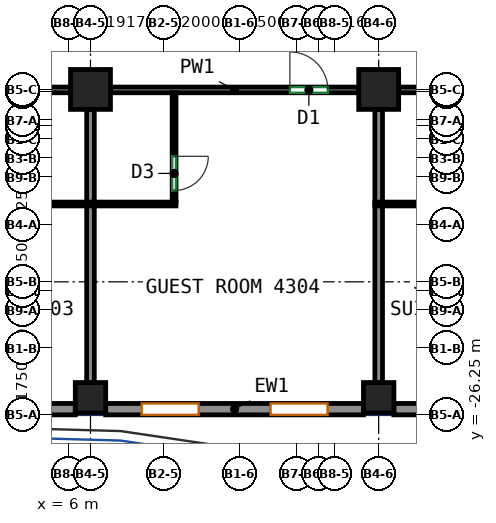
"""IFC4 building model, lengths in metres.
Left out: names, types, materials, properties, quantities, classifications, styles, units other than length and angle.
Written with IfcOpenShell. Run it as: python <this file> out.ifc"""

import sys

from ifc_helpers import new_model, si_unit, direction, frame, frame_2d, origin, origin_2d, place, context, subcontext, project, spatial, rectangle, extrude, source, transform, mapped, element, fill, save


model = new_model("IFC4")
c1 = context("Model", 3, precision=1e-05, world=origin(), true_north=direction((0.0, 1.0)))
c2 = subcontext(c1, "Body", "Model", "MODEL_VIEW")
j1 = project(units=[si_unit("LENGTHUNIT", "METRE"), si_unit("PLANEANGLEUNIT", "RADIAN")], contexts=[c1])
p1 = place(None, origin())
s1 = spatial("IfcSite", under=j1, at=p1, CompositionType="ELEMENT")
p2 = place(p1, origin())
s2 = spatial("IfcBuilding", under=s1, at=p2, CompositionType="ELEMENT")
p3 = place(p2, frame((0.0, 0.0, 182.1)))
s3 = spatial("IfcBuildingStorey", under=s2, at=p3, CompositionType="ELEMENT", Elevation=182.1)
m1 = source(origin(), c2, "Body", "SweptSolid", [
    extrude(rectangle(XDim=0.8, YDim=0.8, at=origin_2d()), origin(), (0.0, 0.0, 1.0), 3.12),
])
p4 = place(p3, frame((6.583, -25.8, 0.0), z_axis=(0.0, 0.0, 1.0), x_axis=(1.0, 0.0, 0.0)))
e1 = element("IfcColumn", 1, at=p4, inside=s3, PredefinedType="COLUMN", context=c2, shape_type="MappedRepresentation", body=[
    mapped(m1, transform((0.0, 0.0, 0.0))),
])
m2 = source(origin(), c2, "Body", "SweptSolid", [
    extrude(rectangle(XDim=1.05, YDim=1.05, at=origin_2d()), origin(), (0.0, 0.0, 1.0), 3.12),
])
p5 = place(p3, frame((6.583, -17.688, 0.0), z_axis=(0.0, 0.0, 1.0), x_axis=(1.0, 0.0, 0.0)))
e2 = element("IfcColumn", 2, at=p5, inside=s3, PredefinedType="COLUMN", context=c2, shape_type="MappedRepresentation", body=[
    mapped(m2, transform((0.0, 0.0, 0.0))),
])
p6 = place(p3, frame((14.167, -25.8, 0.0), z_axis=(0.0, 0.0, 1.0), x_axis=(1.0, 0.0, 0.0)))
e3 = element("IfcColumn", 3, at=p6, inside=s3, PredefinedType="COLUMN", context=c2, shape_type="MappedRepresentation", body=[
    mapped(m1, transform((0.0, 0.0, 0.0))),
])
p7 = place(p3, frame((14.167, -17.688, 0.0), z_axis=(0.0, 0.0, 1.0), x_axis=(1.0, 0.0, 0.0)))
e4 = element("IfcColumn", 4, at=p7, inside=s3, PredefinedType="COLUMN", context=c2, shape_type="MappedRepresentation", body=[
    mapped(m2, transform((0.0, 0.0, 0.0))),
])
m3 = source(origin(), c2, "Body", "SweptSolid", [
    extrude(rectangle(XDim=6.783, YDim=0.3, at=frame_2d((3.392, 0.0))), origin(), (0.0, 0.0, 1.0), 3.12),
])
p8 = place(p3, frame((-0.6, -26.1, 0.0), z_axis=(0.0, 0.0, 1.0), x_axis=(1.0, 0.0, 0.0)))
e5 = element("IfcWall", 5, at=p8, inside=s3, PredefinedType="SOLIDWALL", context=c2, shape_type="MappedRepresentation", body=[
    mapped(m3, transform((0.0, 0.0, 0.0))),
])
p9 = place(p8, frame((0.946, 0.0, 0.85)))
e6 = element("IfcOpeningElement", 6, at=p9, cuts=e5, PredefinedType="OPENING", context=c2, shape_type="SweptSolid", body=[
    extrude(rectangle(XDim=1.5, YDim=1.95, at=frame_2d((0.75, 0.975))), frame((0.0, 0.16, 0.0), z_axis=(0.0, -1.0, 0.0), x_axis=(1.0, 0.0, 0.0)), (0.0, 0.0, 1.0), 0.32),
])
p10 = place(p8, frame((4.337, 0.0, 0.85)))
e7 = element("IfcOpeningElement", 7, at=p10, cuts=e5, PredefinedType="OPENING", context=c2, shape_type="SweptSolid", body=[
    extrude(rectangle(XDim=1.5, YDim=1.95, at=frame_2d((0.75, 0.975))), frame((0.0, 0.16, 0.0), z_axis=(0.0, -1.0, 0.0), x_axis=(1.0, 0.0, 0.0)), (0.0, 0.0, 1.0), 0.32),
])
m4 = source(origin(), c2, "Body", "SweptSolid", [
    extrude(rectangle(XDim=6.783, YDim=0.3, at=frame_2d((3.392, 0.0))), origin(), (0.0, 0.0, 1.0), 3.12),
])
p11 = place(p3, frame((6.983, -26.1, 0.0), z_axis=(0.0, 0.0, 1.0), x_axis=(1.0, 0.0, 0.0)))
e8 = element("IfcWall", 8, at=p11, inside=s3, PredefinedType="SOLIDWALL", context=c2, shape_type="MappedRepresentation", body=[
    mapped(m4, transform((0.0, 0.0, 0.0))),
])
p12 = place(p11, frame((0.946, 0.0, 0.85)))
e9 = element("IfcOpeningElement", 9, at=p12, cuts=e8, PredefinedType="OPENING", context=c2, shape_type="SweptSolid", body=[
    extrude(rectangle(XDim=1.5, YDim=1.95, at=frame_2d((0.75, 0.975))), frame((0.0, 0.16, 0.0), z_axis=(0.0, -1.0, 0.0), x_axis=(1.0, 0.0, 0.0)), (0.0, 0.0, 1.0), 0.32),
])
p13 = place(p11, frame((4.338, 0.0, 0.85)))
e10 = element("IfcOpeningElement", 10, at=p13, cuts=e8, PredefinedType="OPENING", context=c2, shape_type="SweptSolid", body=[
    extrude(rectangle(XDim=1.5, YDim=1.95, at=frame_2d((0.75, 0.975))), frame((0.0, 0.16, 0.0), z_axis=(0.0, -1.0, 0.0), x_axis=(1.0, 0.0, 0.0)), (0.0, 0.0, 1.0), 0.32),
])
p14 = place(p3, frame((14.567, -26.1, 0.0), z_axis=(0.0, 0.0, 1.0), x_axis=(1.0, 0.0, 0.0)))
e11 = element("IfcWall", 11, at=p14, inside=s3, PredefinedType="SOLIDWALL", context=c2, shape_type="MappedRepresentation", body=[
    mapped(m3, transform((0.0, 0.0, 0.0))),
])
p15 = place(p14, frame((0.946, 0.0, 0.85)))
e12 = element("IfcOpeningElement", 12, at=p15, cuts=e11, PredefinedType="OPENING", context=c2, shape_type="SweptSolid", body=[
    extrude(rectangle(XDim=1.5, YDim=1.95, at=frame_2d((0.75, 0.975))), frame((0.0, 0.16, 0.0), z_axis=(0.0, -1.0, 0.0), x_axis=(1.0, 0.0, 0.0)), (0.0, 0.0, 1.0), 0.32),
])
p16 = place(p14, frame((4.337, 0.0, 0.85)))
e13 = element("IfcOpeningElement", 13, at=p16, cuts=e11, PredefinedType="OPENING", context=c2, shape_type="SweptSolid", body=[
    extrude(rectangle(XDim=1.5, YDim=1.95, at=frame_2d((0.75, 0.975))), frame((0.0, 0.16, 0.0), z_axis=(0.0, -1.0, 0.0), x_axis=(1.0, 0.0, 0.0)), (0.0, 0.0, 1.0), 0.32),
])
p17 = place(p3, frame((-0.475, -17.7, 0.0), z_axis=(0.0, 0.0, 1.0), x_axis=(1.0, 0.0, 0.0)))
e14 = element("IfcWall", 14, at=p17, inside=s3, PredefinedType="PARTITIONING", context=c2, shape_type="SweptSolid", body=[
    extrude(rectangle(XDim=6.533, YDim=0.15, at=frame_2d((3.267, 0.0))), origin(), (0.0, 0.0, 1.0), 3.12),
])
p18 = place(p17, frame((1.926, 0.0, 0.0)))
e15 = element("IfcOpeningElement", 15, at=p18, cuts=e14, PredefinedType="OPENING", context=c2, shape_type="SweptSolid", body=[
    extrude(rectangle(XDim=1.0, YDim=2.1, at=frame_2d((0.5, 1.05))), frame((0.0, 0.085, 0.0), z_axis=(0.0, -1.0, 0.0), x_axis=(1.0, 0.0, 0.0)), (0.0, 0.0, 1.0), 0.17),
])
p19 = place(p17, frame((3.387, 0.0, 0.0)))
e16 = element("IfcOpeningElement", 16, at=p19, cuts=e14, PredefinedType="OPENING", context=c2, shape_type="SweptSolid", body=[
    extrude(rectangle(XDim=1.0, YDim=2.1, at=frame_2d((0.5, 1.05))), frame((0.0, 0.085, 0.0), z_axis=(0.0, -1.0, 0.0), x_axis=(1.0, 0.0, 0.0)), (0.0, 0.0, 1.0), 0.17),
])
p20 = place(p3, frame((7.108, -17.7, 0.0), z_axis=(0.0, 0.0, 1.0), x_axis=(1.0, 0.0, 0.0)))
e17 = element("IfcWall", 17, at=p20, inside=s3, PredefinedType="PARTITIONING", context=c2, shape_type="SweptSolid", body=[
    extrude(rectangle(XDim=6.534, YDim=0.15, at=frame_2d((3.267, 0.0))), origin(), (0.0, 0.0, 1.0), 3.12),
])
p21 = place(p20, frame((4.722, 0.0, 0.0)))
e18 = element("IfcOpeningElement", 18, at=p21, cuts=e17, PredefinedType="OPENING", context=c2, shape_type="SweptSolid", body=[
    extrude(rectangle(XDim=1.0, YDim=2.1, at=frame_2d((0.5, 1.05))), frame((0.0, 0.085, 0.0), z_axis=(0.0, -1.0, 0.0), x_axis=(1.0, 0.0, 0.0)), (0.0, 0.0, 1.0), 0.17),
])
p22 = place(p3, frame((14.692, -17.7, 0.0), z_axis=(0.0, 0.0, 1.0), x_axis=(1.0, 0.0, 0.0)))
e19 = element("IfcWall", 19, at=p22, inside=s3, PredefinedType="PARTITIONING", context=c2, shape_type="SweptSolid", body=[
    extrude(rectangle(XDim=7.058, YDim=0.15, at=frame_2d((3.529, 0.0))), origin(), (0.0, 0.0, 1.0), 2.52),
])
p23 = place(p22, frame((2.077, 0.0, 0.0)))
e20 = element("IfcOpeningElement", 20, at=p23, cuts=e19, PredefinedType="OPENING", context=c2, shape_type="SweptSolid", body=[
    extrude(rectangle(XDim=1.0, YDim=2.1, at=frame_2d((0.5, 1.05))), frame((0.0, 0.085, 0.0), z_axis=(0.0, -1.0, 0.0), x_axis=(1.0, 0.0, 0.0)), (0.0, 0.0, 1.0), 0.17),
])
p24 = place(p22, frame((5.657, 0.0, 0.0)))
e21 = element("IfcOpeningElement", 21, at=p24, cuts=e19, PredefinedType="OPENING", context=c2, shape_type="SweptSolid", body=[
    extrude(rectangle(XDim=1.0, YDim=2.1, at=frame_2d((0.5, 1.05))), frame((0.0, 0.085, 0.0), z_axis=(0.0, -1.0, 0.0), x_axis=(1.0, 0.0, 0.0)), (0.0, 0.0, 1.0), 0.17),
])
p25 = place(p3, frame((4.333, -20.702, 0.0), z_axis=(0.0, 0.0, 1.0), x_axis=(1.0, 0.0, 0.0)))
e22 = element("IfcWall", 22, at=p25, inside=s3, PredefinedType="PARTITIONING", context=c2, shape_type="SweptSolid", body=[
    extrude(rectangle(XDim=4.5, YDim=0.1, at=frame_2d((2.25, 0.0))), origin(), (0.0, 0.0, 1.0), 3.12),
])
p26 = place(p3, frame((6.583, -25.4, 0.0), z_axis=(0.0, 0.0, 1.0), x_axis=(0.0, 1.0, 0.0)))
e23 = element("IfcWall", 23, at=p26, inside=s3, PredefinedType="PARTITIONING", context=c2, shape_type="SweptSolid", body=[
    extrude(rectangle(XDim=4.648, YDim=0.2, at=frame_2d((2.324, 0.0))), origin(), (0.0, 0.0, 1.0), 3.12),
])
p27 = place(p3, frame((6.583, -20.652, 0.0), z_axis=(0.0, 0.0, 1.0), x_axis=(0.0, 1.0, 0.0)))
e24 = element("IfcWall", 24, at=p27, inside=s3, PredefinedType="PARTITIONING", context=c2, shape_type="SweptSolid", body=[
    extrude(rectangle(XDim=2.44, YDim=0.2, at=frame_2d((1.22, 0.0))), origin(), (0.0, 0.0, 1.0), 3.12),
])
p28 = place(p3, frame((8.783, -17.777, 0.0), z_axis=(0.0, 0.0, 1.0), x_axis=(0.0, -1.0, 0.0)))
e25 = element("IfcWall", 25, at=p28, inside=s3, PredefinedType="PARTITIONING", context=c2, shape_type="SweptSolid", body=[
    extrude(rectangle(XDim=2.875, YDim=0.1, at=frame_2d((1.438, 0.0))), origin(), (0.0, 0.0, 1.0), 3.12),
])
p29 = place(p28, frame((1.67, 0.0, 0.0)))
e26 = element("IfcOpeningElement", 26, at=p29, cuts=e25, PredefinedType="OPENING", context=c2, shape_type="SweptSolid", body=[
    extrude(rectangle(XDim=0.9, YDim=2.1, at=frame_2d((0.45, 1.05))), frame((0.0, 0.06, 0.0), z_axis=(0.0, -1.0, 0.0), x_axis=(1.0, 0.0, 0.0)), (0.0, 0.0, 1.0), 0.12),
])
p30 = place(p3, frame((14.167, -25.4, 0.0), z_axis=(0.0, 0.0, 1.0), x_axis=(0.0, 1.0, 0.0)))
e27 = element("IfcWall", 27, at=p30, inside=s3, PredefinedType="PARTITIONING", context=c2, shape_type="SweptSolid", body=[
    extrude(rectangle(XDim=4.658, YDim=0.2, at=frame_2d((2.329, 0.0))), origin(), (0.0, 0.0, 1.0), 3.12),
])
p31 = place(p3, frame((14.167, -20.662, 0.0), z_axis=(0.0, 0.0, 1.0), x_axis=(0.0, 1.0, 0.0)))
e28 = element("IfcWall", 28, at=p31, inside=s3, PredefinedType="PARTITIONING", context=c2, shape_type="SweptSolid", body=[
    extrude(rectangle(XDim=2.45, YDim=0.2, at=frame_2d((1.225, 0.0))), origin(), (0.0, 0.0, 1.0), 3.12),
])
p32 = place(p3, frame((14.067, -20.702, 0.0), z_axis=(0.0, 0.0, 1.0), x_axis=(1.0, 0.0, 0.0)))
e29 = element("IfcWall", 29, at=p32, inside=s3, PredefinedType="PARTITIONING", context=c2, shape_type="SweptSolid", body=[
    extrude(rectangle(XDim=2.35, YDim=0.1, at=frame_2d((1.175, 0.0))), origin(), (0.0, 0.0, 1.0), 3.12),
])
p33 = place(p12, origin())
e30 = element("IfcWindow", 30, at=p33, inside=s3, PartitioningType="SINGLE_PANEL", PredefinedType="WINDOW", context=c2, shape_type="SweptSolid", body=[
    extrude(rectangle(XDim=1.5, YDim=1.95, at=frame_2d((0.75, 0.975))), frame((0.0, 0.03, 0.0), z_axis=(0.0, -1.0, 0.0), x_axis=(1.0, 0.0, 0.0)), (0.0, 0.0, 1.0), 0.06),
])
fill(e9, e30)
p34 = place(p13, origin())
e31 = element("IfcWindow", 31, at=p34, inside=s3, PartitioningType="SINGLE_PANEL", PredefinedType="WINDOW", context=c2, shape_type="SweptSolid", body=[
    extrude(rectangle(XDim=1.5, YDim=1.95, at=frame_2d((0.75, 0.975))), frame((0.0, 0.03, 0.0), z_axis=(0.0, -1.0, 0.0), x_axis=(1.0, 0.0, 0.0)), (0.0, 0.0, 1.0), 0.06),
])
fill(e10, e31)
p35 = place(p29, origin())
e32 = element("IfcDoor", 32, at=p35, inside=s3, OperationType="SINGLE_SWING_LEFT", PredefinedType="DOOR", context=c2, shape_type="SweptSolid", body=[
    extrude(rectangle(XDim=0.9, YDim=2.1, at=frame_2d((0.45, 1.05))), frame((0.0, 0.025, 0.0), z_axis=(0.0, -1.0, 0.0), x_axis=(1.0, 0.0, 0.0)), (0.0, 0.0, 1.0), 0.05),
])
fill(e26, e32)
p36 = place(p21, origin())
e33 = element("IfcDoor", 33, at=p36, inside=s3, OperationType="SINGLE_SWING_LEFT", PredefinedType="DOOR", context=c2, shape_type="SweptSolid", body=[
    extrude(rectangle(XDim=1.0, YDim=2.1, at=frame_2d((0.5, 1.05))), frame((0.0, 0.025, 0.0), z_axis=(0.0, -1.0, 0.0), x_axis=(1.0, 0.0, 0.0)), (0.0, 0.0, 1.0), 0.05),
])
fill(e18, e33)
save(model, sys.argv[1])
